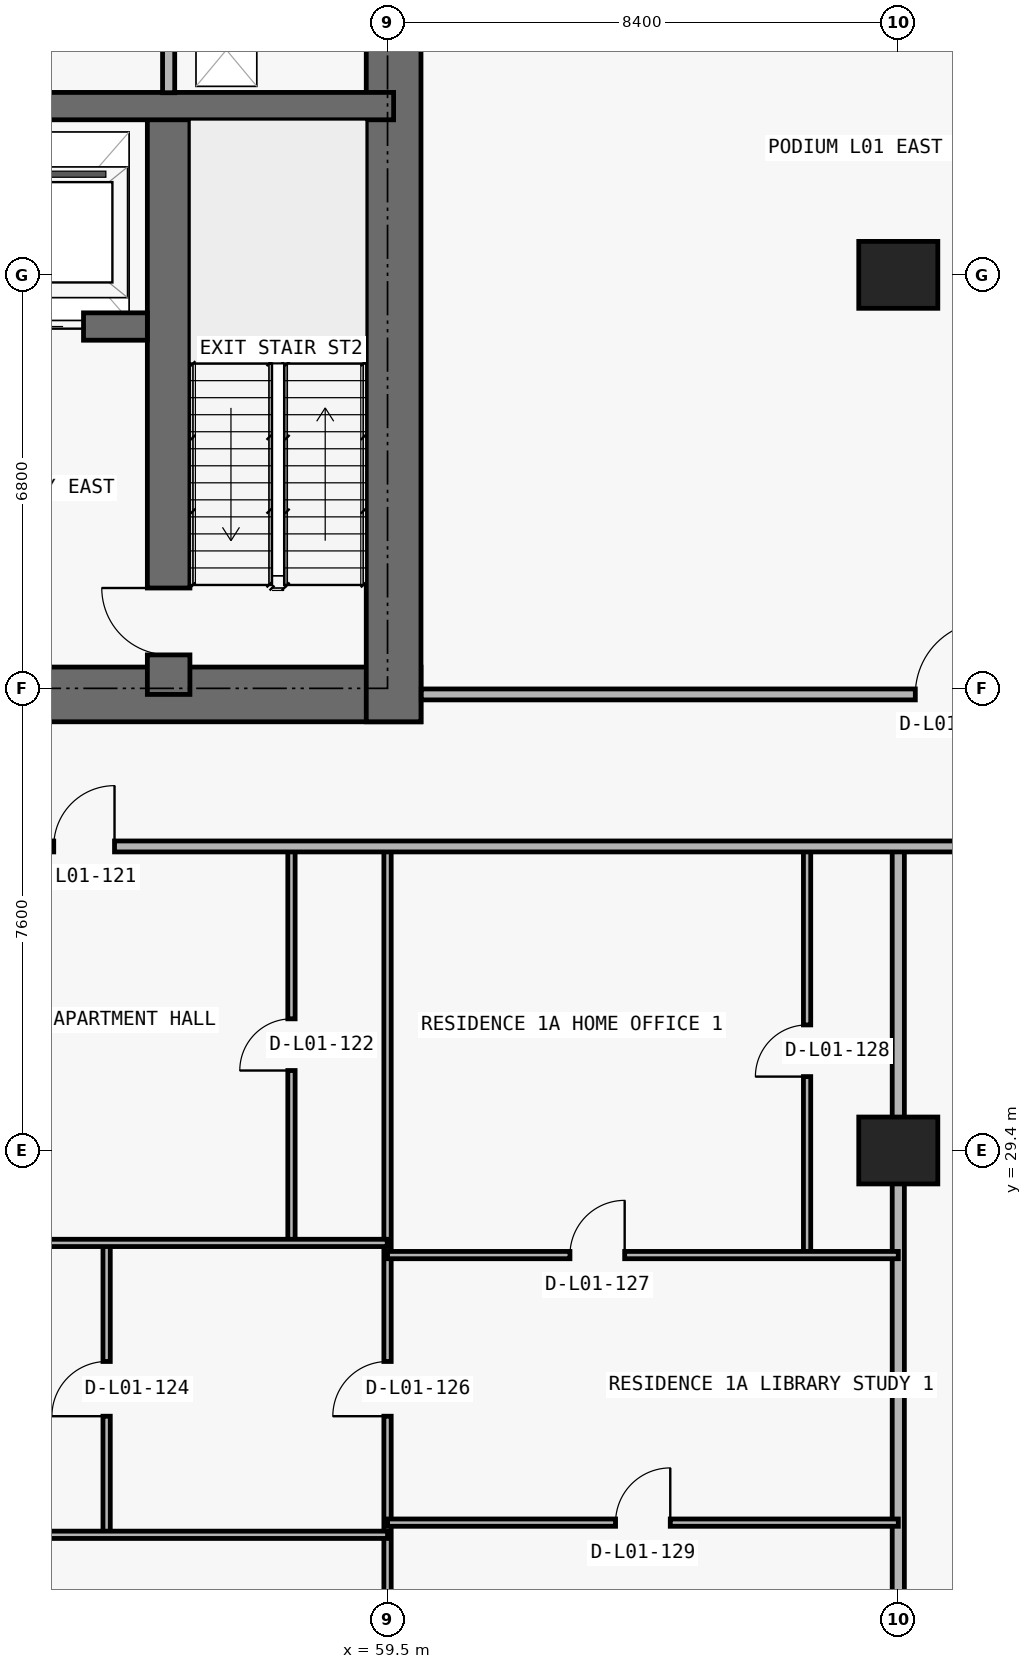
"""IFC4 building model, lengths in metres.
Left out: names, types, materials, properties, quantities, classifications, styles, units other than length and angle.
Written with IfcOpenShell. Run it as: python <this file> out.ifc"""

import sys

from ifc_helpers import new_model, si_unit, direction, frame, frame_2d, origin, origin_2d, place, context, subcontext, project, spatial, rectangle, extrude, element, fill, save


model = new_model("IFC4")
c1 = context("Model", 3, precision=1e-05, world=origin(), true_north=direction((0.0, 1.0)))
c2 = subcontext(c1, "Body", "Model", "MODEL_VIEW")
j1 = project(units=[si_unit("LENGTHUNIT", "METRE"), si_unit("PLANEANGLEUNIT", "RADIAN")], contexts=[c1])
p1 = place(None, origin())
s1 = spatial("IfcSite", under=j1, at=p1, CompositionType="ELEMENT")
p2 = place(p1, origin())
s2 = spatial("IfcBuilding", under=s1, at=p2, CompositionType="ELEMENT")
p3 = place(p2, frame((0.0, 0.0, 5.4)))
s3 = spatial("IfcBuildingStorey", under=s2, at=p3, CompositionType="ELEMENT", Elevation=5.4)
for number, where, z_axis, x_axis in (
    (1, (67.9, 29.4, 0.0), (0.0, 0.0, 1.0), (1.0, 0.0, 0.0)),
    (2, (67.9, 43.8, 0.0), (0.0, 0.0, 1.0), (1.0, 0.0, 0.0)),
):
    element("IfcColumn", number, at=place(p3, frame(where, z_axis=z_axis, x_axis=x_axis)), inside=s3, PredefinedType="COLUMN", context=c2, shape_type="SweptSolid", body=[
        extrude(rectangle(XDim=1.3, YDim=1.1, at=origin_2d()), origin(), (0.0, 0.0, 1.0), 4.5),
    ])
p4 = place(p3, frame((17.75, 36.9, 0.0), z_axis=(0.0, 0.0, 1.0), x_axis=(1.0, 0.0, 0.0)))
e3 = element("IfcWall", 3, at=p4, inside=s3, PredefinedType="SHEAR", context=c2, shape_type="SweptSolid", body=[
    extrude(rectangle(XDim=42.3, YDim=0.9, at=frame_2d((21.15, 0.0))), origin(), (0.0, 0.0, 1.0), 4.5),
])
p5 = place(p4, frame((14.55, 0.0, 0.0)))
e4 = element("IfcOpeningElement", 4, at=p5, cuts=e3, PredefinedType="OPENING", context=c2, shape_type="SweptSolid", body=[
    extrude(rectangle(XDim=1.1, YDim=2.15, at=frame_2d((0.55, 1.075))), frame((0.0, 0.46, 0.0), z_axis=(0.0, -1.0, 0.0), x_axis=(1.0, 0.0, 0.0)), (0.0, 0.0, 1.0), 0.92),
])
p6 = place(p4, frame((6.4, 0.0, 0.0)))
e5 = element("IfcOpeningElement", 5, at=p6, cuts=e3, PredefinedType="OPENING", context=c2, shape_type="SweptSolid", body=[
    extrude(rectangle(XDim=1.05, YDim=2.15, at=frame_2d((0.525, 1.075))), frame((0.0, 0.46, 0.0), z_axis=(0.0, -1.0, 0.0), x_axis=(1.0, 0.0, 0.0)), (0.0, 0.0, 1.0), 0.92),
])
p7 = place(p4, frame((34.9, 0.0, 0.0)))
e6 = element("IfcOpeningElement", 6, at=p7, cuts=e3, PredefinedType="OPENING", context=c2, shape_type="SweptSolid", body=[
    extrude(rectangle(XDim=1.05, YDim=2.15, at=frame_2d((0.525, 1.075))), frame((0.0, 0.46, 0.0), z_axis=(0.0, -1.0, 0.0), x_axis=(1.0, 0.0, 0.0)), (0.0, 0.0, 1.0), 0.92),
])
p8 = place(p4, frame((11.012, 0.0, 0.0)))
e7 = element("IfcOpeningElement", 7, at=p8, cuts=e3, PredefinedType="OPENING", context=c2, shape_type="SweptSolid", body=[
    extrude(rectangle(XDim=1.05, YDim=2.15, at=frame_2d((0.525, 1.075))), frame((0.0, 0.46, 0.0), z_axis=(0.0, -1.0, 0.0), x_axis=(1.0, 0.0, 0.0)), (0.0, 0.0, 1.0), 0.92),
])
p9 = place(p4, frame((24.25, 0.0, 0.0)))
e8 = element("IfcOpeningElement", 8, at=p9, cuts=e3, PredefinedType="OPENING", context=c2, shape_type="SweptSolid", body=[
    extrude(rectangle(XDim=1.05, YDim=2.15, at=frame_2d((0.525, 1.075))), frame((0.0, 0.46, 0.0), z_axis=(0.0, -1.0, 0.0), x_axis=(1.0, 0.0, 0.0)), (0.0, 0.0, 1.0), 0.92),
])
p10 = place(p3, frame((59.6, 36.45, 0.0), z_axis=(0.0, 0.0, 1.0), x_axis=(0.0, 1.0, 0.0)))
e9 = element("IfcWall", 9, at=p10, inside=s3, PredefinedType="SHEAR", context=c2, shape_type="SweptSolid", body=[
    extrude(rectangle(XDim=14.15, YDim=0.9, at=frame_2d((7.075, 0.0))), origin(), (0.0, 0.0, 1.0), 4.5),
])
p11 = place(p3, frame((55.9, 36.9, 0.0), z_axis=(0.0, 0.0, 1.0), x_axis=(0.0, 1.0, 0.0)))
e10 = element("IfcWall", 10, at=p11, inside=s3, PredefinedType="SHEAR", context=c2, shape_type="SweptSolid", body=[
    extrude(rectangle(XDim=9.675, YDim=0.7, at=frame_2d((4.837, 0.0))), origin(), (0.0, 0.0, 1.0), 4.5),
])
p12 = place(p11, frame((0.65, 0.0, 0.0)))
e11 = element("IfcOpeningElement", 11, at=p12, cuts=e10, PredefinedType="OPENING", context=c2, shape_type="SweptSolid", body=[
    extrude(rectangle(XDim=1.1, YDim=2.15, at=frame_2d((0.55, 1.075))), frame((0.0, 0.36, 0.0), z_axis=(0.0, -1.0, 0.0), x_axis=(1.0, 0.0, 0.0)), (0.0, 0.0, 1.0), 0.72),
])
p13 = place(p3, frame((22.25, 42.95, 0.0), z_axis=(0.0, 0.0, 1.0), x_axis=(1.0, 0.0, 0.0)))
e12 = element("IfcWall", 12, at=p13, inside=s3, PredefinedType="SHEAR", context=c2, shape_type="SweptSolid", body=[
    extrude(rectangle(XDim=33.3, YDim=0.45, at=frame_2d((16.65, 0.0))), origin(), (0.0, 0.0, 1.0), 4.5),
])
p14 = place(p13, frame((1.05, 0.0, 0.0)))
e13 = element("IfcOpeningElement", 13, at=p14, cuts=e12, PredefinedType="OPENING", context=c2, shape_type="SweptSolid", body=[
    extrude(rectangle(XDim=1.2, YDim=2.2, at=frame_2d((0.6, 1.1))), frame((0.0, 0.235, 0.0), z_axis=(0.0, -1.0, 0.0), x_axis=(1.0, 0.0, 0.0)), (0.0, 0.0, 1.0), 0.47),
])
p15 = place(p13, frame((31.05, 0.0, 0.0)))
e14 = element("IfcOpeningElement", 14, at=p15, cuts=e12, PredefinedType="OPENING", context=c2, shape_type="SweptSolid", body=[
    extrude(rectangle(XDim=1.2, YDim=2.2, at=frame_2d((0.6, 1.1))), frame((0.0, 0.235, 0.0), z_axis=(0.0, -1.0, 0.0), x_axis=(1.0, 0.0, 0.0)), (0.0, 0.0, 1.0), 0.47),
])
p16 = place(p13, frame((13.5, 0.0, 0.0)))
e15 = element("IfcOpeningElement", 15, at=p16, cuts=e12, PredefinedType="OPENING", context=c2, shape_type="SweptSolid", body=[
    extrude(rectangle(XDim=1.1, YDim=2.2, at=frame_2d((0.55, 1.1))), frame((0.0, 0.235, 0.0), z_axis=(0.0, -1.0, 0.0), x_axis=(1.0, 0.0, 0.0)), (0.0, 0.0, 1.0), 0.47),
])
p17 = place(p13, frame((16.1, 0.0, 0.0)))
e16 = element("IfcOpeningElement", 16, at=p17, cuts=e12, PredefinedType="OPENING", context=c2, shape_type="SweptSolid", body=[
    extrude(rectangle(XDim=1.1, YDim=2.2, at=frame_2d((0.55, 1.1))), frame((0.0, 0.235, 0.0), z_axis=(0.0, -1.0, 0.0), x_axis=(1.0, 0.0, 0.0)), (0.0, 0.0, 1.0), 0.47),
])
p18 = place(p13, frame((18.7, 0.0, 0.0)))
e17 = element("IfcOpeningElement", 17, at=p18, cuts=e12, PredefinedType="OPENING", context=c2, shape_type="SweptSolid", body=[
    extrude(rectangle(XDim=1.1, YDim=2.2, at=frame_2d((0.55, 1.1))), frame((0.0, 0.235, 0.0), z_axis=(0.0, -1.0, 0.0), x_axis=(1.0, 0.0, 0.0)), (0.0, 0.0, 1.0), 0.47),
])
p19 = place(p13, frame((3.625, 0.0, 0.0)))
e18 = element("IfcOpeningElement", 18, at=p19, cuts=e12, PredefinedType="OPENING", context=c2, shape_type="SweptSolid", body=[
    extrude(rectangle(XDim=1.05, YDim=2.15, at=frame_2d((0.525, 1.075))), frame((0.0, 0.235, 0.0), z_axis=(0.0, -1.0, 0.0), x_axis=(1.0, 0.0, 0.0)), (0.0, 0.0, 1.0), 0.47),
])
p20 = place(p13, frame((28.675, 0.0, 0.0)))
e19 = element("IfcOpeningElement", 19, at=p20, cuts=e12, PredefinedType="OPENING", context=c2, shape_type="SweptSolid", body=[
    extrude(rectangle(XDim=1.05, YDim=2.15, at=frame_2d((0.525, 1.075))), frame((0.0, 0.235, 0.0), z_axis=(0.0, -1.0, 0.0), x_axis=(1.0, 0.0, 0.0)), (0.0, 0.0, 1.0), 0.47),
])
p21 = place(p3, frame((18.2, 46.575, 0.0), z_axis=(0.0, 0.0, 1.0), x_axis=(1.0, 0.0, 0.0)))
e20 = element("IfcWall", 20, at=p21, inside=s3, PredefinedType="SHEAR", context=c2, shape_type="SweptSolid", body=[
    extrude(rectangle(XDim=41.4, YDim=0.45, at=frame_2d((20.7, 0.0))), origin(), (0.0, 0.0, 1.0), 4.5),
])
p22 = place(p21, frame((7.675, 0.0, 0.0)))
e21 = element("IfcOpeningElement", 21, at=p22, cuts=e20, PredefinedType="OPENING", context=c2, shape_type="SweptSolid", body=[
    extrude(rectangle(XDim=1.05, YDim=2.15, at=frame_2d((0.525, 1.075))), frame((0.0, 0.235, 0.0), z_axis=(0.0, -1.0, 0.0), x_axis=(1.0, 0.0, 0.0)), (0.0, 0.0, 1.0), 0.47),
])
p23 = place(p21, frame((32.725, 0.0, 0.0)))
e22 = element("IfcOpeningElement", 22, at=p23, cuts=e20, PredefinedType="OPENING", context=c2, shape_type="SweptSolid", body=[
    extrude(rectangle(XDim=1.05, YDim=2.15, at=frame_2d((0.525, 1.075))), frame((0.0, 0.235, 0.0), z_axis=(0.0, -1.0, 0.0), x_axis=(1.0, 0.0, 0.0)), (0.0, 0.0, 1.0), 0.47),
])
p24 = place(p3, frame((54.88, 23.08, 0.0), z_axis=(0.0, 0.0, 1.0), x_axis=(0.0, 1.0, 0.0)))
e23 = element("IfcWall", 23, at=p24, inside=s3, PredefinedType="PARTITIONING", context=c2, shape_type="SweptSolid", body=[
    extrude(rectangle(XDim=4.8, YDim=0.12, at=frame_2d((2.4, 0.0))), origin(), (0.0, 0.0, 1.0), 4.5),
])
p25 = place(p24, frame((1.95, 0.0, 0.0)))
e24 = element("IfcOpeningElement", 24, at=p25, cuts=e23, PredefinedType="OPENING", context=c2, shape_type="SweptSolid", body=[
    extrude(rectangle(XDim=0.9, YDim=2.15, at=frame_2d((0.45, 1.075))), frame((0.0, 0.07, 0.0), z_axis=(0.0, -1.0, 0.0), x_axis=(1.0, 0.0, 0.0)), (0.0, 0.0, 1.0), 0.14),
])
p26 = place(p3, frame((55.9, 46.795, 0.0), z_axis=(0.0, 0.0, 1.0), x_axis=(0.0, 1.0, 0.0)))
e25 = element("IfcWall", 25, at=p26, inside=s3, PredefinedType="PARTITIONING", context=c2, shape_type="SweptSolid", body=[
    extrude(rectangle(XDim=2.91, YDim=0.2, at=frame_2d((1.455, 0.0))), origin(), (0.0, 0.0, 1.0), 4.5),
])
p27 = place(p3, frame((57.92, 27.88, 0.0), z_axis=(0.0, 0.0, 1.0), x_axis=(0.0, 1.0, 0.0)))
e26 = element("IfcWall", 26, at=p27, inside=s3, PredefinedType="PARTITIONING", context=c2, shape_type="SweptSolid", body=[
    extrude(rectangle(XDim=6.52, YDim=0.12, at=frame_2d((3.26, 0.0))), origin(), (0.0, 0.0, 1.0), 3.873),
])
p28 = place(p27, frame((2.835, 0.0, 0.0)))
e27 = element("IfcOpeningElement", 27, at=p28, cuts=e26, PredefinedType="OPENING", context=c2, shape_type="SweptSolid", body=[
    extrude(rectangle(XDim=0.85, YDim=2.1, at=frame_2d((0.425, 1.05))), frame((0.0, 0.07, 0.0), z_axis=(0.0, -1.0, 0.0), x_axis=(1.0, 0.0, 0.0)), (0.0, 0.0, 1.0), 0.14),
])
p29 = place(p3, frame((59.5, 0.295, 0.0), z_axis=(0.0, 0.0, 1.0), x_axis=(0.0, 1.0, 0.0)))
e28 = element("IfcWall", 28, at=p29, inside=s3, PredefinedType="PARTITIONING", context=c2, shape_type="SweptSolid", body=[
    extrude(rectangle(XDim=34.105, YDim=0.12, at=frame_2d((17.052, 0.0))), origin(), (0.0, 0.0, 1.0), 4.5),
])
p30 = place(p29, frame((24.735, 0.0, 0.0)))
e29 = element("IfcOpeningElement", 29, at=p30, cuts=e28, PredefinedType="OPENING", context=c2, shape_type="SweptSolid", body=[
    extrude(rectangle(XDim=0.9, YDim=2.15, at=frame_2d((0.45, 1.075))), frame((0.0, 0.07, 0.0), z_axis=(0.0, -1.0, 0.0), x_axis=(1.0, 0.0, 0.0)), (0.0, 0.0, 1.0), 0.14),
])
p31 = place(p3, frame((66.4, 27.68, 0.0), z_axis=(0.0, 0.0, 1.0), x_axis=(0.0, 1.0, 0.0)))
e30 = element("IfcWall", 30, at=p31, inside=s3, PredefinedType="PARTITIONING", context=c2, shape_type="SweptSolid", body=[
    extrude(rectangle(XDim=6.72, YDim=0.12, at=frame_2d((3.36, 0.0))), origin(), (0.0, 0.0, 1.0), 4.5),
])
p32 = place(p31, frame((2.935, 0.0, 0.0)))
e31 = element("IfcOpeningElement", 31, at=p32, cuts=e30, PredefinedType="OPENING", context=c2, shape_type="SweptSolid", body=[
    extrude(rectangle(XDim=0.85, YDim=2.1, at=frame_2d((0.425, 1.05))), frame((0.0, 0.07, 0.0), z_axis=(0.0, -1.0, 0.0), x_axis=(1.0, 0.0, 0.0)), (0.0, 0.0, 1.0), 0.14),
])
p33 = place(p3, frame((67.9, 0.295, 0.0), z_axis=(0.0, 0.0, 1.0), x_axis=(0.0, 1.0, 0.0)))
e32 = element("IfcWall", 32, at=p33, inside=s3, PredefinedType="PARTITIONING", context=c2, shape_type="SweptSolid", body=[
    extrude(rectangle(XDim=34.105, YDim=0.2, at=frame_2d((17.052, 0.0))), origin(), (0.0, 0.0, 1.0), 3.464),
])
p34 = place(p3, frame((51.1, 23.08, 0.0), z_axis=(0.0, 0.0, 1.0), x_axis=(1.0, 0.0, 0.0)))
e33 = element("IfcWall", 33, at=p34, inside=s3, PredefinedType="PARTITIONING", context=c2, shape_type="SweptSolid", body=[
    extrude(rectangle(XDim=8.4, YDim=0.12, at=frame_2d((4.2, 0.0))), origin(), (0.0, 0.0, 1.0), 4.5),
])
p35 = place(p34, frame((1.44, 0.0, 0.0)))
e34 = element("IfcOpeningElement", 34, at=p35, cuts=e33, PredefinedType="OPENING", context=c2, shape_type="SweptSolid", body=[
    extrude(rectangle(XDim=0.9, YDim=2.15, at=frame_2d((0.45, 1.075))), frame((0.0, 0.07, 0.0), z_axis=(0.0, -1.0, 0.0), x_axis=(1.0, 0.0, 0.0)), (0.0, 0.0, 1.0), 0.14),
])
p36 = place(p3, frame((59.5, 23.28, 0.0), z_axis=(0.0, 0.0, 1.0), x_axis=(1.0, 0.0, 0.0)))
e35 = element("IfcWall", 35, at=p36, inside=s3, PredefinedType="PARTITIONING", context=c2, shape_type="SweptSolid", body=[
    extrude(rectangle(XDim=8.4, YDim=0.12, at=frame_2d((4.2, 0.0))), origin(), (0.0, 0.0, 1.0), 4.5),
])
p37 = place(p36, frame((3.75, 0.0, 0.0)))
e36 = element("IfcOpeningElement", 36, at=p37, cuts=e35, PredefinedType="OPENING", context=c2, shape_type="SweptSolid", body=[
    extrude(rectangle(XDim=0.9, YDim=2.15, at=frame_2d((0.45, 1.075))), frame((0.0, 0.07, 0.0), z_axis=(0.0, -1.0, 0.0), x_axis=(1.0, 0.0, 0.0)), (0.0, 0.0, 1.0), 0.14),
])
p38 = place(p3, frame((59.5, 27.68, 0.0), z_axis=(0.0, 0.0, 1.0), x_axis=(1.0, 0.0, 0.0)))
e37 = element("IfcWall", 37, at=p38, inside=s3, PredefinedType="PARTITIONING", context=c2, shape_type="SweptSolid", body=[
    extrude(rectangle(XDim=8.4, YDim=0.12, at=frame_2d((4.2, 0.0))), origin(), (0.0, 0.0, 1.0), 4.5),
])
p39 = place(p38, frame((3.0, 0.0, 0.0)))
e38 = element("IfcOpeningElement", 38, at=p39, cuts=e37, PredefinedType="OPENING", context=c2, shape_type="SweptSolid", body=[
    extrude(rectangle(XDim=0.9, YDim=2.15, at=frame_2d((0.45, 1.075))), frame((0.0, 0.07, 0.0), z_axis=(0.0, -1.0, 0.0), x_axis=(1.0, 0.0, 0.0)), (0.0, 0.0, 1.0), 0.14),
])
p40 = place(p3, frame((51.1, 27.88, 0.0), z_axis=(0.0, 0.0, 1.0), x_axis=(1.0, 0.0, 0.0)))
e39 = element("IfcWall", 39, at=p40, inside=s3, PredefinedType="PARTITIONING", context=c2, shape_type="SweptSolid", body=[
    extrude(rectangle(XDim=8.395, YDim=0.12, at=frame_2d((4.198, 0.0))), origin(), (0.0, 0.0, 1.0), 4.5),
])
p41 = place(p40, frame((1.44, 0.0, 0.0)))
e40 = element("IfcOpeningElement", 40, at=p41, cuts=e39, PredefinedType="OPENING", context=c2, shape_type="SweptSolid", body=[
    extrude(rectangle(XDim=0.9, YDim=2.15, at=frame_2d((0.45, 1.075))), frame((0.0, 0.07, 0.0), z_axis=(0.0, -1.0, 0.0), x_axis=(1.0, 0.0, 0.0)), (0.0, 0.0, 1.0), 0.14),
])
p42 = place(p3, frame((0.295, 34.4, 0.0), z_axis=(0.0, 0.0, 1.0), x_axis=(1.0, 0.0, 0.0)))
e41 = element("IfcWall", 41, at=p42, inside=s3, PredefinedType="PARTITIONING", context=c2, shape_type="SweptSolid", body=[
    extrude(rectangle(XDim=77.21, YDim=0.18, at=frame_2d((38.605, 0.0))), origin(), (0.0, 0.0, 1.0), 4.5),
])
p43 = place(p42, frame((12.677, 0.0, 0.0)))
e42 = element("IfcOpeningElement", 42, at=p43, cuts=e41, PredefinedType="OPENING", context=c2, shape_type="SweptSolid", body=[
    extrude(rectangle(XDim=1.05, YDim=2.15, at=frame_2d((0.525, 1.075))), frame((0.0, 0.1, 0.0), z_axis=(0.0, -1.0, 0.0), x_axis=(1.0, 0.0, 0.0)), (0.0, 0.0, 1.0), 0.2),
])
p44 = place(p42, frame((38.08, 0.0, 0.0)))
e43 = element("IfcOpeningElement", 43, at=p44, cuts=e41, PredefinedType="OPENING", context=c2, shape_type="SweptSolid", body=[
    extrude(rectangle(XDim=1.05, YDim=2.15, at=frame_2d((0.525, 1.075))), frame((0.0, 0.1, 0.0), z_axis=(0.0, -1.0, 0.0), x_axis=(1.0, 0.0, 0.0)), (0.0, 0.0, 1.0), 0.2),
])
p45 = place(p42, frame((53.715, 0.0, 0.0)))
e44 = element("IfcOpeningElement", 44, at=p45, cuts=e41, PredefinedType="OPENING", context=c2, shape_type="SweptSolid", body=[
    extrude(rectangle(XDim=1.0, YDim=2.2, at=frame_2d((0.5, 1.1))), frame((0.0, 0.1, 0.0), z_axis=(0.0, -1.0, 0.0), x_axis=(1.0, 0.0, 0.0)), (0.0, 0.0, 1.0), 0.2),
])
p46 = place(p42, frame((71.883, 0.0, 0.0)))
e45 = element("IfcOpeningElement", 45, at=p46, cuts=e41, PredefinedType="OPENING", context=c2, shape_type="SweptSolid", body=[
    extrude(rectangle(XDim=1.05, YDim=2.15, at=frame_2d((0.525, 1.075))), frame((0.0, 0.1, 0.0), z_axis=(0.0, -1.0, 0.0), x_axis=(1.0, 0.0, 0.0)), (0.0, 0.0, 1.0), 0.2),
])
p47 = place(p3, frame((60.055, 36.9, 0.0), z_axis=(0.0, 0.0, 1.0), x_axis=(1.0, 0.0, 0.0)))
e46 = element("IfcWall", 46, at=p47, inside=s3, PredefinedType="PARTITIONING", context=c2, shape_type="SweptSolid", body=[
    extrude(rectangle(XDim=17.45, YDim=0.18, at=frame_2d((8.725, 0.0))), origin(), (0.0, 0.0, 1.0), 4.5),
])
p48 = place(p47, frame((8.125, 0.0, 0.0)))
e47 = element("IfcOpeningElement", 47, at=p48, cuts=e46, PredefinedType="OPENING", context=c2, shape_type="SweptSolid", body=[
    extrude(rectangle(XDim=1.2, YDim=2.2, at=frame_2d((0.6, 1.1))), frame((0.0, 0.1, 0.0), z_axis=(0.0, -1.0, 0.0), x_axis=(1.0, 0.0, 0.0)), (0.0, 0.0, 1.0), 0.2),
])
p49 = place(p15, origin())
e48 = element("IfcDoor", 48, at=p49, inside=s3, OperationType="DOUBLE_DOOR_SLIDING", PredefinedType="DOOR", context=c2, shape_type="SweptSolid", body=[
    extrude(rectangle(XDim=1.2, YDim=2.2, at=frame_2d((0.6, 1.1))), frame((0.0, 0.025, 0.0), z_axis=(0.0, -1.0, 0.0), x_axis=(1.0, 0.0, 0.0)), (0.0, 0.0, 1.0), 0.05),
])
fill(e14, e48)
p50 = place(p12, origin())
e49 = element("IfcDoor", 49, at=p50, inside=s3, OperationType="SINGLE_SWING_RIGHT", PredefinedType="DOOR", context=c2, shape_type="SweptSolid", body=[
    extrude(rectangle(XDim=1.1, YDim=2.15, at=frame_2d((0.55, 1.075))), frame((0.0, 0.025, 0.0), z_axis=(0.0, -1.0, 0.0), x_axis=(1.0, 0.0, 0.0)), (0.0, 0.0, 1.0), 0.05),
])
fill(e11, e49)
p51 = place(p45, origin())
e50 = element("IfcDoor", 50, at=p51, inside=s3, OperationType="SINGLE_SWING_RIGHT", PredefinedType="DOOR", context=c2, shape_type="SweptSolid", body=[
    extrude(rectangle(XDim=1.0, YDim=2.2, at=frame_2d((0.5, 1.1))), frame((0.0, 0.025, 0.0), z_axis=(0.0, -1.0, 0.0), x_axis=(1.0, 0.0, 0.0)), (0.0, 0.0, 1.0), 0.05),
])
fill(e44, e50)
p52 = place(p28, origin())
e51 = element("IfcDoor", 51, at=p52, inside=s3, OperationType="SINGLE_SWING_LEFT", PredefinedType="DOOR", context=c2, shape_type="SweptSolid", body=[
    extrude(rectangle(XDim=0.85, YDim=2.1, at=frame_2d((0.425, 1.05))), frame((0.0, 0.025, 0.0), z_axis=(0.0, -1.0, 0.0), x_axis=(1.0, 0.0, 0.0)), (0.0, 0.0, 1.0), 0.05),
])
fill(e27, e51)
p53 = place(p25, origin())
e52 = element("IfcDoor", 52, at=p53, inside=s3, OperationType="SINGLE_SWING_LEFT", PredefinedType="DOOR", context=c2, shape_type="SweptSolid", body=[
    extrude(rectangle(XDim=0.9, YDim=2.15, at=frame_2d((0.45, 1.075))), frame((0.0, 0.025, 0.0), z_axis=(0.0, -1.0, 0.0), x_axis=(1.0, 0.0, 0.0)), (0.0, 0.0, 1.0), 0.05),
])
fill(e24, e52)
p54 = place(p30, origin())
e53 = element("IfcDoor", 53, at=p54, inside=s3, OperationType="SINGLE_SWING_LEFT", PredefinedType="DOOR", context=c2, shape_type="SweptSolid", body=[
    extrude(rectangle(XDim=0.9, YDim=2.15, at=frame_2d((0.45, 1.075))), frame((0.0, 0.025, 0.0), z_axis=(0.0, -1.0, 0.0), x_axis=(1.0, 0.0, 0.0)), (0.0, 0.0, 1.0), 0.05),
])
fill(e29, e53)
p55 = place(p39, origin())
e54 = element("IfcDoor", 54, at=p55, inside=s3, OperationType="SINGLE_SWING_RIGHT", PredefinedType="DOOR", context=c2, shape_type="SweptSolid", body=[
    extrude(rectangle(XDim=0.9, YDim=2.15, at=frame_2d((0.45, 1.075))), frame((0.0, 0.025, 0.0), z_axis=(0.0, -1.0, 0.0), x_axis=(1.0, 0.0, 0.0)), (0.0, 0.0, 1.0), 0.05),
])
fill(e38, e54)
p56 = place(p32, origin())
e55 = element("IfcDoor", 55, at=p56, inside=s3, OperationType="SINGLE_SWING_LEFT", PredefinedType="DOOR", context=c2, shape_type="SweptSolid", body=[
    extrude(rectangle(XDim=0.85, YDim=2.1, at=frame_2d((0.425, 1.05))), frame((0.0, 0.025, 0.0), z_axis=(0.0, -1.0, 0.0), x_axis=(1.0, 0.0, 0.0)), (0.0, 0.0, 1.0), 0.05),
])
fill(e31, e55)
p57 = place(p37, origin())
e56 = element("IfcDoor", 56, at=p57, inside=s3, OperationType="SINGLE_SWING_RIGHT", PredefinedType="DOOR", context=c2, shape_type="SweptSolid", body=[
    extrude(rectangle(XDim=0.9, YDim=2.15, at=frame_2d((0.45, 1.075))), frame((0.0, 0.025, 0.0), z_axis=(0.0, -1.0, 0.0), x_axis=(1.0, 0.0, 0.0)), (0.0, 0.0, 1.0), 0.05),
])
fill(e36, e56)
p58 = place(p48, origin())
e57 = element("IfcDoor", 57, at=p58, inside=s3, OperationType="SINGLE_SWING_RIGHT", PredefinedType="DOOR", context=c2, shape_type="SweptSolid", body=[
    extrude(rectangle(XDim=1.2, YDim=2.2, at=frame_2d((0.6, 1.1))), frame((0.0, 0.025, 0.0), z_axis=(0.0, -1.0, 0.0), x_axis=(1.0, 0.0, 0.0)), (0.0, 0.0, 1.0), 0.05),
])
fill(e47, e57)
save(model, sys.argv[1])
